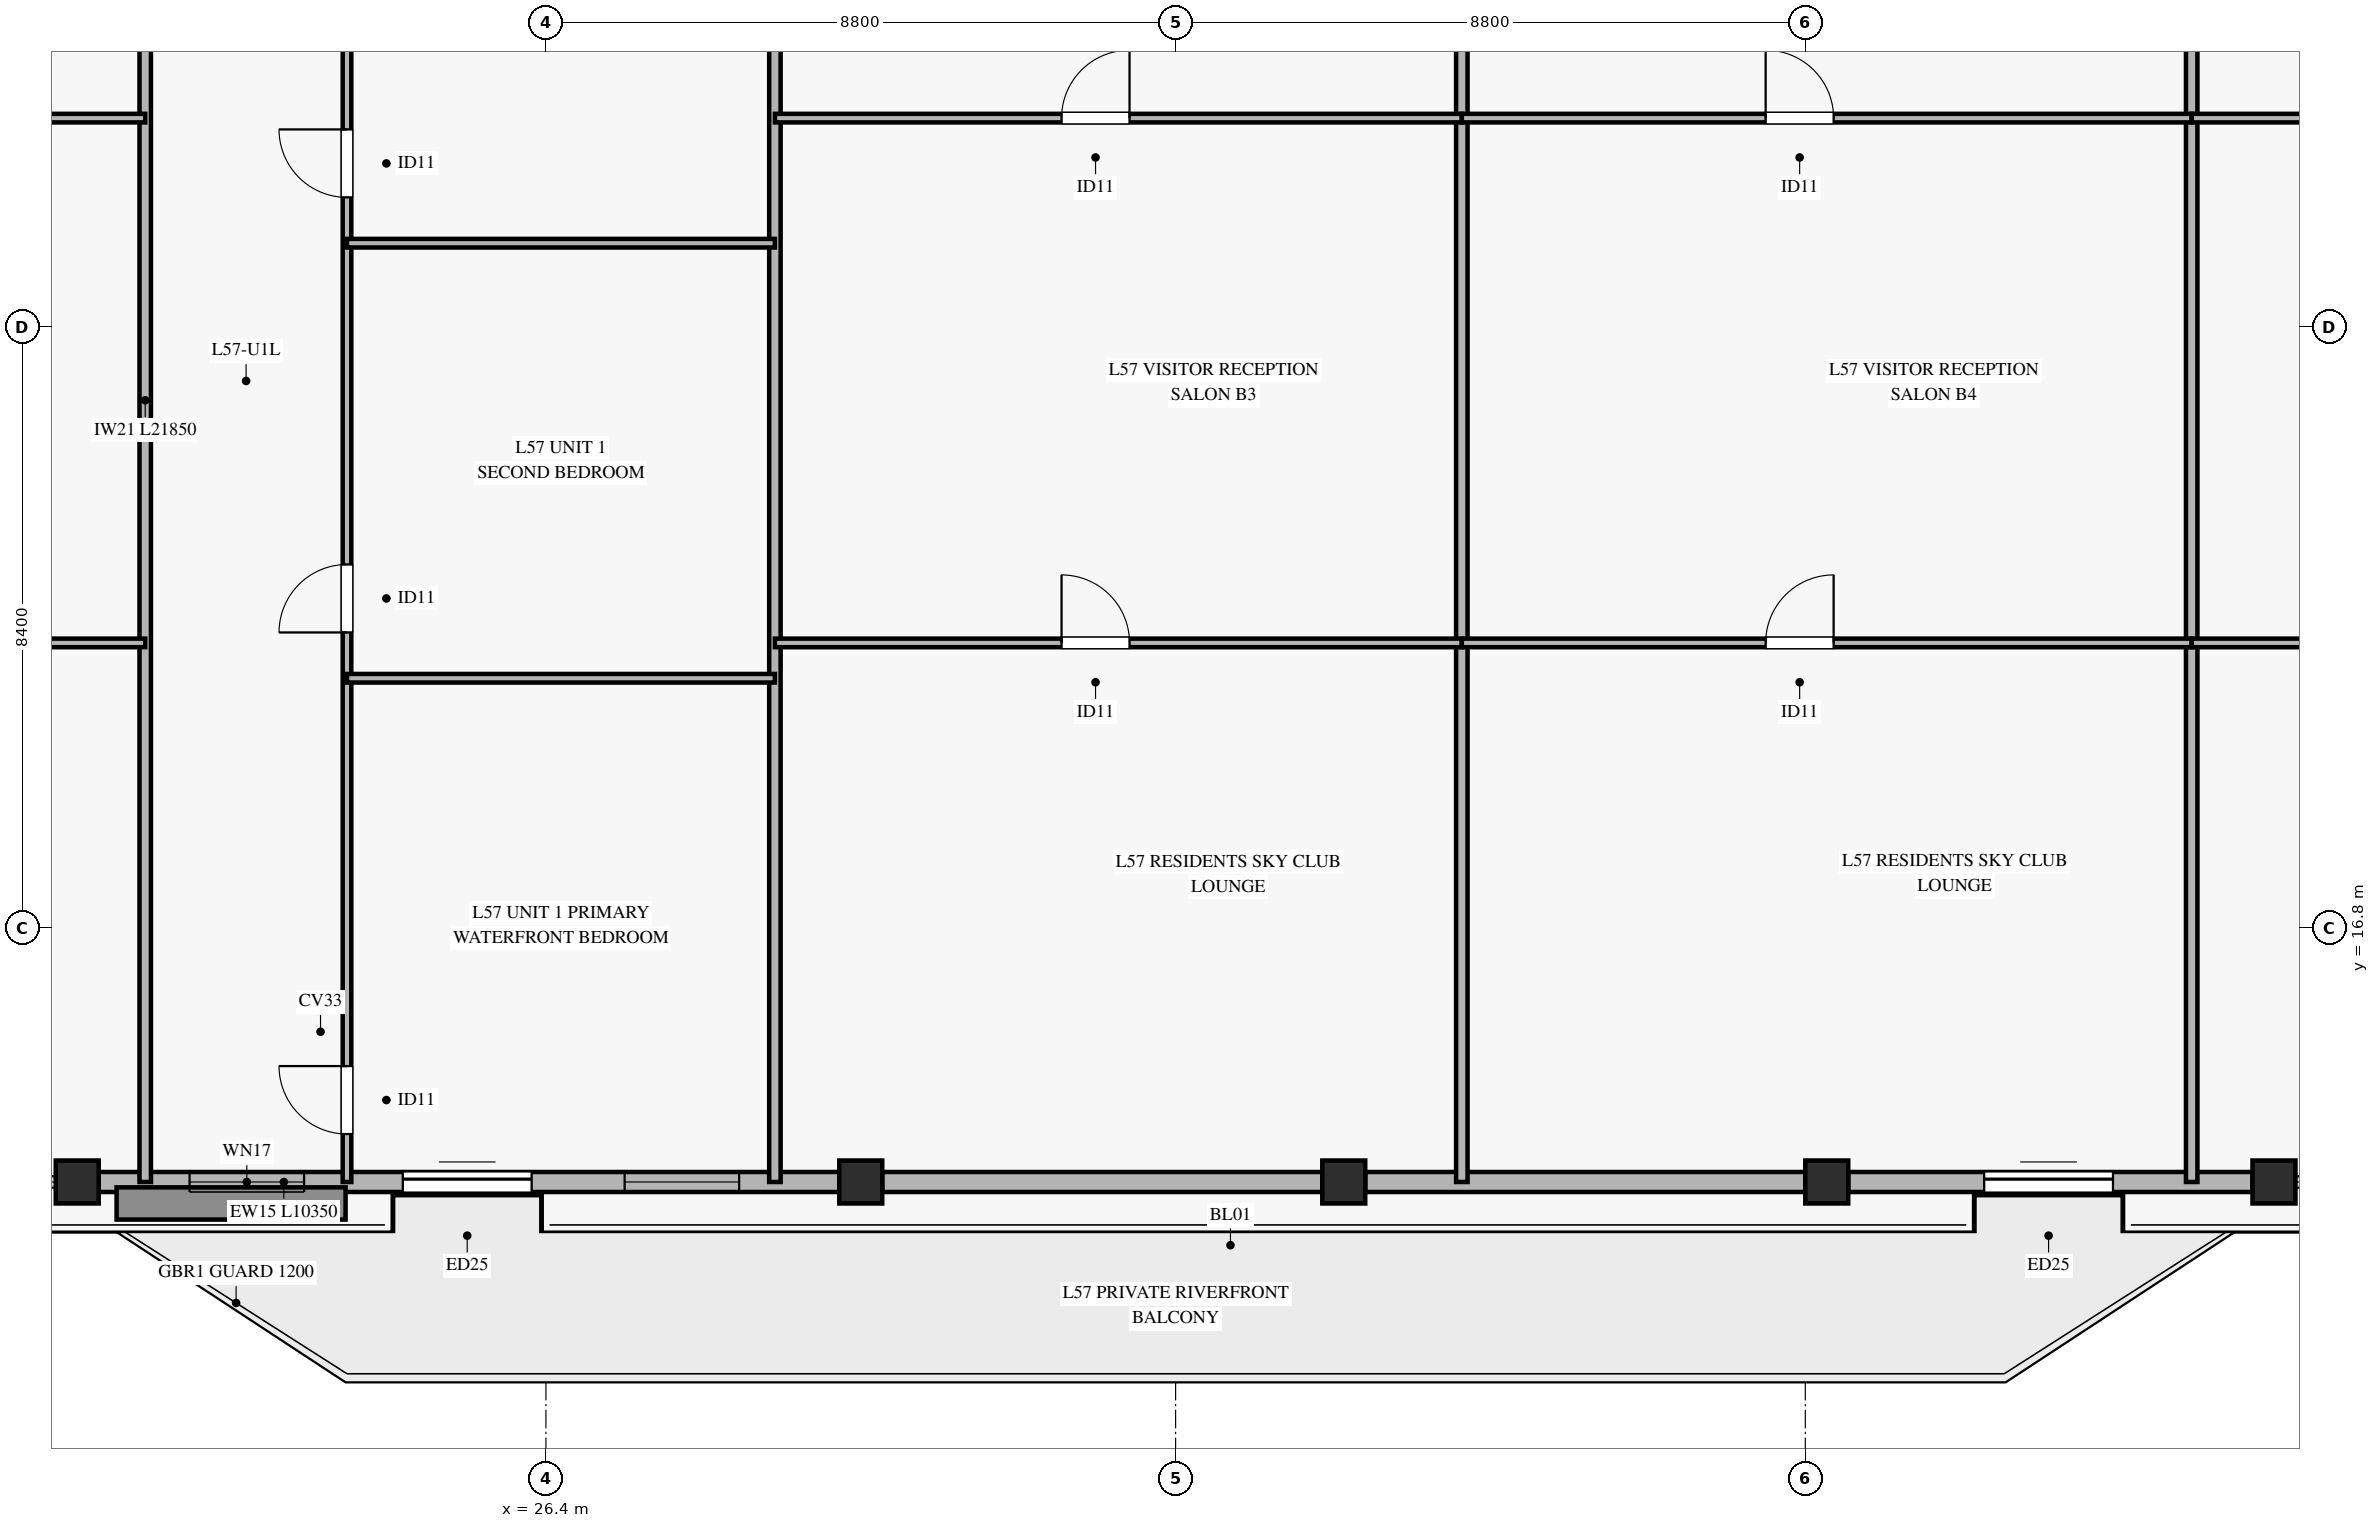
"""IFC4 building model, lengths in metres.
Left out: names, types, materials, properties, quantities, classifications, styles, units other than length and angle.
Written with IfcOpenShell. Run it as: python <this file> out.ifc"""

import sys

from ifc_helpers import new_model, si_unit, direction, frame, frame_2d, origin, origin_2d, place, context, subcontext, project, spatial, rectangle, hollow_rectangle, extrude, source, transform, mapped, element, fill, save


model = new_model("IFC4")
c1 = context("Model", 3, precision=1e-05, world=origin(), true_north=direction((0.0, 1.0)))
c2 = subcontext(c1, "Body", "Model", "MODEL_VIEW")
j1 = project(units=[si_unit("LENGTHUNIT", "METRE"), si_unit("PLANEANGLEUNIT", "RADIAN")], contexts=[c1])
p1 = place(None, origin())
s1 = spatial("IfcSite", under=j1, at=p1, CompositionType="ELEMENT")
p2 = place(p1, origin())
s2 = spatial("IfcBuilding", under=s1, at=p2, CompositionType="ELEMENT")
p3 = place(p2, frame((0.0, 0.0, 227.0)))
s3 = spatial("IfcBuildingStorey", under=s2, at=p3, CompositionType="ELEMENT", Elevation=227.0)
m1 = source(origin(), c2, "Body", "SweptSolid", [
    extrude(hollow_rectangle(XDim=0.6, YDim=0.6, WallThickness=0.028, at=origin_2d()), origin(), (0.0, 0.0, 1.0), 3.185),
])
for number, where, z_axis, x_axis in (
    (1, (19.85, 13.25, 0.0), (0.0, 0.0, 1.0), (1.0, 0.0, 0.0)),
    (2, (30.8, 13.25, 0.0), (0.0, 0.0, 1.0), (1.0, 0.0, 0.0)),
    (3, (37.55, 13.25, 0.0), (0.0, 0.0, 1.0), (1.0, 0.0, 0.0)),
    (4, (44.3, 13.25, 0.0), (0.0, 0.0, 1.0), (1.0, 0.0, 0.0)),
    (5, (50.55, 13.25, 0.0), (0.0, 0.0, 1.0), (1.0, 0.0, 0.0)),
):
    element("IfcColumn", number, at=place(p3, frame(where, z_axis=z_axis, x_axis=x_axis)), inside=s3, PredefinedType="COLUMN", context=c2, shape_type="MappedRepresentation", body=[
        mapped(m1, transform((0.0, 0.0, 0.0), x_axis=(1.0, 0.0, 0.0), y_axis=(0.0, 1.0, 0.0), z_axis=(0.0, 0.0, 1.0), scale=1.0)),
    ])
p4 = place(p3, frame((20.15, 13.25, 0.0), z_axis=(0.0, 0.0, 1.0), x_axis=(1.0, 0.0, 0.0)))
e6 = element("IfcWall", 6, at=p4, inside=s3, PredefinedType="SOLIDWALL", context=c2, shape_type="SweptSolid", body=[
    extrude(rectangle(XDim=10.35, YDim=0.28, at=frame_2d((5.175, 0.0))), origin(), (0.0, 0.0, 1.0), 2.815),
])
p5 = place(p4, frame((4.25, 0.0, 0.0)))
e7 = element("IfcOpeningElement", 7, at=p5, cuts=e6, PredefinedType="OPENING", context=c2, shape_type="SweptSolid", body=[
    extrude(rectangle(XDim=1.8, YDim=2.25, at=frame_2d((0.9, 1.125))), frame((0.0, 0.15, 0.0), z_axis=(0.0, -1.0, 0.0), x_axis=(1.0, 0.0, 0.0)), (0.0, 0.0, 1.0), 0.3),
])
p6 = place(p4, frame((1.27, 0.0, 0.45)))
e8 = element("IfcOpeningElement", 8, at=p6, cuts=e6, PredefinedType="OPENING", context=c2, shape_type="SweptSolid", body=[
    extrude(rectangle(XDim=1.6, YDim=2.0, at=frame_2d((0.8, 1.0))), frame((0.0, 0.15, 0.0), z_axis=(0.0, -1.0, 0.0), x_axis=(1.0, 0.0, 0.0)), (0.0, 0.0, 1.0), 0.3),
])
p7 = place(p4, frame((7.35, 0.0, 0.45)))
e9 = element("IfcOpeningElement", 9, at=p7, cuts=e6, PredefinedType="OPENING", context=c2, shape_type="SweptSolid", body=[
    extrude(rectangle(XDim=1.6, YDim=2.0, at=frame_2d((0.8, 1.0))), frame((0.0, 0.15, 0.0), z_axis=(0.0, -1.0, 0.0), x_axis=(1.0, 0.0, 0.0)), (0.0, 0.0, 1.0), 0.3),
])
for number, where, z_axis, x_axis in (
    (10, (31.1, 13.25, 0.0), (0.0, 0.0, 1.0), (1.0, 0.0, 0.0)),
    (11, (37.85, 13.25, 0.0), (0.0, 0.0, 1.0), (1.0, 0.0, 0.0)),
):
    element("IfcWall", number, at=place(p3, frame(where, z_axis=z_axis, x_axis=x_axis)), inside=s3, PredefinedType="SOLIDWALL", context=c2, shape_type="SweptSolid", body=[
        extrude(rectangle(XDim=6.15, YDim=0.28, at=frame_2d((3.075, 0.0))), origin(), (0.0, 0.0, 1.0), 2.815),
    ])
p8 = place(p3, frame((44.6, 13.25, 0.0), z_axis=(0.0, 0.0, 1.0), x_axis=(1.0, 0.0, 0.0)))
e12 = element("IfcWall", 12, at=p8, inside=s3, PredefinedType="SOLIDWALL", context=c2, shape_type="SweptSolid", body=[
    extrude(rectangle(XDim=5.65, YDim=0.28, at=frame_2d((2.825, 0.0))), origin(), (0.0, 0.0, 1.0), 2.815),
])
p9 = place(p8, frame((1.9, 0.0, 0.0)))
e13 = element("IfcOpeningElement", 13, at=p9, cuts=e12, PredefinedType="OPENING", context=c2, shape_type="SweptSolid", body=[
    extrude(rectangle(XDim=1.8, YDim=2.25, at=frame_2d((0.9, 1.125))), frame((0.0, 0.15, 0.0), z_axis=(0.0, -1.0, 0.0), x_axis=(1.0, 0.0, 0.0)), (0.0, 0.0, 1.0), 0.3),
])
for number, where, z_axis, x_axis in (
    (14, (20.8, 13.25, 0.0), (0.0, 0.0, 1.0), (0.0, 1.0, 0.0)),
    (15, (29.6, 13.25, 0.0), (0.0, 0.0, 1.0), (0.0, 1.0, 0.0)),
    (16, (39.2, 13.25, 0.0), (0.0, 0.0, 1.0), (0.0, 1.0, 0.0)),
    (17, (49.4, 13.25, 0.0), (0.0, 0.0, 1.0), (0.0, 1.0, 0.0)),
):
    element("IfcWall", number, at=place(p3, frame(where, z_axis=z_axis, x_axis=x_axis)), inside=s3, PredefinedType="PARTITIONING", context=c2, shape_type="SweptSolid", body=[
        extrude(rectangle(XDim=21.85, YDim=0.16, at=frame_2d((10.925, 0.0))), origin(), (0.0, 0.0, 1.0), 2.77),
    ])
p10 = place(p3, frame((7.533, 20.784, 0.0), z_axis=(0.0, 0.0, 1.0), x_axis=(1.0, 0.0, 0.0)))
e18 = element("IfcWall", 18, at=p10, inside=s3, PredefinedType="PARTITIONING", context=c2, shape_type="SweptSolid", body=[
    extrude(rectangle(XDim=13.267, YDim=0.12, at=frame_2d((6.634, 0.0))), origin(), (0.0, 0.0, 1.0), 2.37),
])
p11 = place(p10, frame((5.593, 0.0, 0.0)))
e19 = element("IfcOpeningElement", 19, at=p11, cuts=e18, PredefinedType="OPENING", context=c2, shape_type="SweptSolid", body=[
    extrude(rectangle(XDim=0.95, YDim=2.1, at=frame_2d((0.475, 1.05))), frame((0.0, 0.07, 0.0), z_axis=(0.0, -1.0, 0.0), x_axis=(1.0, 0.0, 0.0)), (0.0, 0.0, 1.0), 0.14),
])
p12 = place(p3, frame((7.533, 28.118, 0.0), z_axis=(0.0, 0.0, 1.0), x_axis=(1.0, 0.0, 0.0)))
e20 = element("IfcWall", 20, at=p12, inside=s3, PredefinedType="PARTITIONING", context=c2, shape_type="SweptSolid", body=[
    extrude(rectangle(XDim=13.267, YDim=0.12, at=frame_2d((6.634, 0.0))), origin(), (0.0, 0.0, 1.0), 2.37),
])
p13 = place(p12, frame((5.593, 0.0, 0.0)))
e21 = element("IfcOpeningElement", 21, at=p13, cuts=e20, PredefinedType="OPENING", context=c2, shape_type="SweptSolid", body=[
    extrude(rectangle(XDim=0.95, YDim=2.1, at=frame_2d((0.475, 1.05))), frame((0.0, 0.07, 0.0), z_axis=(0.0, -1.0, 0.0), x_axis=(1.0, 0.0, 0.0)), (0.0, 0.0, 1.0), 0.14),
])
p14 = place(p3, frame((23.62, 13.25, 0.0), z_axis=(0.0, 0.0, 1.0), x_axis=(0.0, 1.0, 0.0)))
e22 = element("IfcWall", 22, at=p14, inside=s3, PredefinedType="PARTITIONING", context=c2, shape_type="SweptSolid", body=[
    extrude(rectangle(XDim=19.2, YDim=0.12, at=frame_2d((9.6, 0.0))), origin(), (0.0, 0.0, 1.0), 2.77),
])
p15 = place(p14, frame((0.67, 0.0, 0.0)))
e23 = element("IfcOpeningElement", 23, at=p15, cuts=e22, PredefinedType="OPENING", context=c2, shape_type="SweptSolid", body=[
    extrude(rectangle(XDim=0.95, YDim=2.1, at=frame_2d((0.475, 1.05))), frame((0.0, 0.07, 0.0), z_axis=(0.0, -1.0, 0.0), x_axis=(1.0, 0.0, 0.0)), (0.0, 0.0, 1.0), 0.14),
])
p16 = place(p14, frame((7.68, 0.0, 0.0)))
e24 = element("IfcOpeningElement", 24, at=p16, cuts=e22, PredefinedType="OPENING", context=c2, shape_type="SweptSolid", body=[
    extrude(rectangle(XDim=0.95, YDim=2.1, at=frame_2d((0.475, 1.05))), frame((0.0, 0.07, 0.0), z_axis=(0.0, -1.0, 0.0), x_axis=(1.0, 0.0, 0.0)), (0.0, 0.0, 1.0), 0.14),
])
p17 = place(p14, frame((13.76, 0.0, 0.0)))
e25 = element("IfcOpeningElement", 25, at=p17, cuts=e22, PredefinedType="OPENING", context=c2, shape_type="SweptSolid", body=[
    extrude(rectangle(XDim=0.95, YDim=2.1, at=frame_2d((0.475, 1.05))), frame((0.0, 0.07, 0.0), z_axis=(0.0, -1.0, 0.0), x_axis=(1.0, 0.0, 0.0)), (0.0, 0.0, 1.0), 0.14),
])
for number, where, z_axis, x_axis in (
    (26, (23.62, 20.29, 0.0), (0.0, 0.0, 1.0), (1.0, 0.0, 0.0)),
    (27, (23.62, 26.37, 0.0), (0.0, 0.0, 1.0), (1.0, 0.0, 0.0)),
):
    element("IfcWall", number, at=place(p3, frame(where, z_axis=z_axis, x_axis=x_axis)), inside=s3, PredefinedType="PARTITIONING", context=c2, shape_type="SweptSolid", body=[
        extrude(rectangle(XDim=5.98, YDim=0.12, at=frame_2d((2.99, 0.0))), origin(), (0.0, 0.0, 1.0), 3.185),
    ])
p18 = place(p3, frame((29.6, 20.784, 0.0), z_axis=(0.0, 0.0, 1.0), x_axis=(1.0, 0.0, 0.0)))
e28 = element("IfcWall", 28, at=p18, inside=s3, PredefinedType="PARTITIONING", context=c2, shape_type="SweptSolid", body=[
    extrude(rectangle(XDim=9.6, YDim=0.12, at=frame_2d((4.8, 0.0))), origin(), (0.0, 0.0, 1.0), 2.37),
])
p19 = place(p18, frame((4.006, 0.0, 0.0)))
e29 = element("IfcOpeningElement", 29, at=p19, cuts=e28, PredefinedType="OPENING", context=c2, shape_type="SweptSolid", body=[
    extrude(rectangle(XDim=0.95, YDim=2.1, at=frame_2d((0.475, 1.05))), frame((0.0, 0.07, 0.0), z_axis=(0.0, -1.0, 0.0), x_axis=(1.0, 0.0, 0.0)), (0.0, 0.0, 1.0), 0.14),
])
p20 = place(p3, frame((29.6, 28.118, 0.0), z_axis=(0.0, 0.0, 1.0), x_axis=(1.0, 0.0, 0.0)))
e30 = element("IfcWall", 30, at=p20, inside=s3, PredefinedType="PARTITIONING", context=c2, shape_type="SweptSolid", body=[
    extrude(rectangle(XDim=9.6, YDim=0.12, at=frame_2d((4.8, 0.0))), origin(), (0.0, 0.0, 1.0), 2.37),
])
p21 = place(p20, frame((4.006, 0.0, 0.0)))
e31 = element("IfcOpeningElement", 31, at=p21, cuts=e30, PredefinedType="OPENING", context=c2, shape_type="SweptSolid", body=[
    extrude(rectangle(XDim=0.95, YDim=2.1, at=frame_2d((0.475, 1.05))), frame((0.0, 0.07, 0.0), z_axis=(0.0, -1.0, 0.0), x_axis=(1.0, 0.0, 0.0)), (0.0, 0.0, 1.0), 0.14),
])
p22 = place(p3, frame((39.2, 20.784, 0.0), z_axis=(0.0, 0.0, 1.0), x_axis=(1.0, 0.0, 0.0)))
e32 = element("IfcWall", 32, at=p22, inside=s3, PredefinedType="PARTITIONING", context=c2, shape_type="SweptSolid", body=[
    extrude(rectangle(XDim=10.2, YDim=0.12, at=frame_2d((5.1, 0.0))), origin(), (0.0, 0.0, 1.0), 2.37),
])
p23 = place(p22, frame((4.246, 0.0, 0.0)))
e33 = element("IfcOpeningElement", 33, at=p23, cuts=e32, PredefinedType="OPENING", context=c2, shape_type="SweptSolid", body=[
    extrude(rectangle(XDim=0.95, YDim=2.1, at=frame_2d((0.475, 1.05))), frame((0.0, 0.07, 0.0), z_axis=(0.0, -1.0, 0.0), x_axis=(1.0, 0.0, 0.0)), (0.0, 0.0, 1.0), 0.14),
])
p24 = place(p3, frame((39.2, 28.118, 0.0), z_axis=(0.0, 0.0, 1.0), x_axis=(1.0, 0.0, 0.0)))
e34 = element("IfcWall", 34, at=p24, inside=s3, PredefinedType="PARTITIONING", context=c2, shape_type="SweptSolid", body=[
    extrude(rectangle(XDim=10.2, YDim=0.12, at=frame_2d((5.1, 0.0))), origin(), (0.0, 0.0, 1.0), 2.37),
])
p25 = place(p24, frame((4.246, 0.0, 0.0)))
e35 = element("IfcOpeningElement", 35, at=p25, cuts=e34, PredefinedType="OPENING", context=c2, shape_type="SweptSolid", body=[
    extrude(rectangle(XDim=0.95, YDim=2.1, at=frame_2d((0.475, 1.05))), frame((0.0, 0.07, 0.0), z_axis=(0.0, -1.0, 0.0), x_axis=(1.0, 0.0, 0.0)), (0.0, 0.0, 1.0), 0.14),
])
p26 = place(p3, frame((49.4, 20.784, 0.0), z_axis=(0.0, 0.0, 1.0), x_axis=(1.0, 0.0, 0.0)))
e36 = element("IfcWall", 36, at=p26, inside=s3, PredefinedType="PARTITIONING", context=c2, shape_type="SweptSolid", body=[
    extrude(rectangle(XDim=13.467, YDim=0.12, at=frame_2d((6.733, 0.0))), origin(), (0.0, 0.0, 1.0), 2.37),
])
p27 = place(p26, frame((5.473, 0.0, 0.0)))
e37 = element("IfcOpeningElement", 37, at=p27, cuts=e36, PredefinedType="OPENING", context=c2, shape_type="SweptSolid", body=[
    extrude(rectangle(XDim=0.95, YDim=2.1, at=frame_2d((0.475, 1.05))), frame((0.0, 0.07, 0.0), z_axis=(0.0, -1.0, 0.0), x_axis=(1.0, 0.0, 0.0)), (0.0, 0.0, 1.0), 0.14),
])
p28 = place(p3, frame((49.4, 28.118, 0.0), z_axis=(0.0, 0.0, 1.0), x_axis=(1.0, 0.0, 0.0)))
e38 = element("IfcWall", 38, at=p28, inside=s3, PredefinedType="PARTITIONING", context=c2, shape_type="SweptSolid", body=[
    extrude(rectangle(XDim=13.467, YDim=0.12, at=frame_2d((6.733, 0.0))), origin(), (0.0, 0.0, 1.0), 2.37),
])
p29 = place(p28, frame((5.473, 0.0, 0.0)))
e39 = element("IfcOpeningElement", 39, at=p29, cuts=e38, PredefinedType="OPENING", context=c2, shape_type="SweptSolid", body=[
    extrude(rectangle(XDim=0.95, YDim=2.1, at=frame_2d((0.475, 1.05))), frame((0.0, 0.07, 0.0), z_axis=(0.0, -1.0, 0.0), x_axis=(1.0, 0.0, 0.0)), (0.0, 0.0, 1.0), 0.14),
])
m2 = source(origin(), c2, "Body", "SweptSolid", [
    extrude(rectangle(XDim=1.8, YDim=2.25, at=frame_2d((0.9, 1.125))), frame((0.0, 0.025, 0.0), z_axis=(0.0, -1.0, 0.0), x_axis=(1.0, 0.0, 0.0)), (0.0, 0.0, 1.0), 0.05),
])
p30 = place(p5, origin())
e40 = element("IfcDoor", 40, at=p30, inside=s3, OperationType="SLIDING_TO_LEFT", PredefinedType="DOOR", context=c2, shape_type="MappedRepresentation", body=[
    mapped(m2, transform((0.0, 0.0, 0.0), x_axis=(1.0, 0.0, 0.0), y_axis=(0.0, 1.0, 0.0), z_axis=(0.0, 0.0, 1.0), scale=1.0)),
])
fill(e7, e40)
m3 = source(origin(), c2, "Body", "SweptSolid", [
    extrude(rectangle(XDim=1.6, YDim=2.0, at=frame_2d((0.8, 1.0))), frame((0.0, 0.03, 0.0), z_axis=(0.0, -1.0, 0.0), x_axis=(1.0, 0.0, 0.0)), (0.0, 0.0, 1.0), 0.06),
])
p31 = place(p6, origin())
e41 = element("IfcWindow", 41, at=p31, inside=s3, PartitioningType="SINGLE_PANEL", PredefinedType="WINDOW", context=c2, shape_type="MappedRepresentation", body=[
    mapped(m3, transform((0.0, 0.0, 0.0), x_axis=(1.0, 0.0, 0.0), y_axis=(0.0, 1.0, 0.0), z_axis=(0.0, 0.0, 1.0), scale=1.0)),
])
fill(e8, e41)
p32 = place(p7, origin())
e42 = element("IfcWindow", 42, at=p32, inside=s3, PartitioningType="SINGLE_PANEL", PredefinedType="WINDOW", context=c2, shape_type="MappedRepresentation", body=[
    mapped(m3, transform((0.0, 0.0, 0.0), x_axis=(1.0, 0.0, 0.0), y_axis=(0.0, 1.0, 0.0), z_axis=(0.0, 0.0, 1.0), scale=1.0)),
])
fill(e9, e42)
p33 = place(p9, origin())
e43 = element("IfcDoor", 43, at=p33, inside=s3, OperationType="SLIDING_TO_LEFT", PredefinedType="DOOR", context=c2, shape_type="MappedRepresentation", body=[
    mapped(m2, transform((0.0, 0.0, 0.0), x_axis=(1.0, 0.0, 0.0), y_axis=(0.0, 1.0, 0.0), z_axis=(0.0, 0.0, 1.0), scale=1.0)),
])
fill(e13, e43)
m4 = source(origin(), c2, "Body", "SweptSolid", [
    extrude(rectangle(XDim=0.95, YDim=2.1, at=frame_2d((0.475, 1.05))), frame((0.0, 0.025, 0.0), z_axis=(0.0, -1.0, 0.0), x_axis=(1.0, 0.0, 0.0)), (0.0, 0.0, 1.0), 0.05),
])
p34 = place(p15, origin())
e44 = element("IfcDoor", 44, at=p34, inside=s3, OperationType="SINGLE_SWING_RIGHT", PredefinedType="DOOR", context=c2, shape_type="MappedRepresentation", body=[
    mapped(m4, transform((0.0, 0.0, 0.0), x_axis=(1.0, 0.0, 0.0), y_axis=(0.0, 1.0, 0.0), z_axis=(0.0, 0.0, 1.0), scale=1.0)),
])
fill(e23, e44)
p35 = place(p16, origin())
e45 = element("IfcDoor", 45, at=p35, inside=s3, OperationType="SINGLE_SWING_LEFT", PredefinedType="DOOR", context=c2, shape_type="MappedRepresentation", body=[
    mapped(m4, transform((0.0, 0.0, 0.0), x_axis=(1.0, 0.0, 0.0), y_axis=(0.0, 1.0, 0.0), z_axis=(0.0, 0.0, 1.0), scale=1.0)),
])
fill(e24, e45)
p36 = place(p17, origin())
e46 = element("IfcDoor", 46, at=p36, inside=s3, OperationType="SINGLE_SWING_RIGHT", PredefinedType="DOOR", context=c2, shape_type="MappedRepresentation", body=[
    mapped(m4, transform((0.0, 0.0, 0.0), x_axis=(1.0, 0.0, 0.0), y_axis=(0.0, 1.0, 0.0), z_axis=(0.0, 0.0, 1.0), scale=1.0)),
])
fill(e25, e46)
p37 = place(p21, origin())
e47 = element("IfcDoor", 47, at=p37, inside=s3, OperationType="SINGLE_SWING_RIGHT", PredefinedType="DOOR", context=c2, shape_type="MappedRepresentation", body=[
    mapped(m4, transform((0.0, 0.0, 0.0), x_axis=(1.0, 0.0, 0.0), y_axis=(0.0, 1.0, 0.0), z_axis=(0.0, 0.0, 1.0), scale=1.0)),
])
fill(e31, e47)
p38 = place(p19, origin())
e48 = element("IfcDoor", 48, at=p38, inside=s3, OperationType="SINGLE_SWING_LEFT", PredefinedType="DOOR", context=c2, shape_type="MappedRepresentation", body=[
    mapped(m4, transform((0.0, 0.0, 0.0), x_axis=(1.0, 0.0, 0.0), y_axis=(0.0, 1.0, 0.0), z_axis=(0.0, 0.0, 1.0), scale=1.0)),
])
fill(e29, e48)
p39 = place(p25, origin())
e49 = element("IfcDoor", 49, at=p39, inside=s3, OperationType="SINGLE_SWING_LEFT", PredefinedType="DOOR", context=c2, shape_type="MappedRepresentation", body=[
    mapped(m4, transform((0.0, 0.0, 0.0), x_axis=(1.0, 0.0, 0.0), y_axis=(0.0, 1.0, 0.0), z_axis=(0.0, 0.0, 1.0), scale=1.0)),
])
fill(e35, e49)
p40 = place(p23, origin())
e50 = element("IfcDoor", 50, at=p40, inside=s3, OperationType="SINGLE_SWING_RIGHT", PredefinedType="DOOR", context=c2, shape_type="MappedRepresentation", body=[
    mapped(m4, transform((0.0, 0.0, 0.0), x_axis=(1.0, 0.0, 0.0), y_axis=(0.0, 1.0, 0.0), z_axis=(0.0, 0.0, 1.0), scale=1.0)),
])
fill(e33, e50)
save(model, sys.argv[1])
